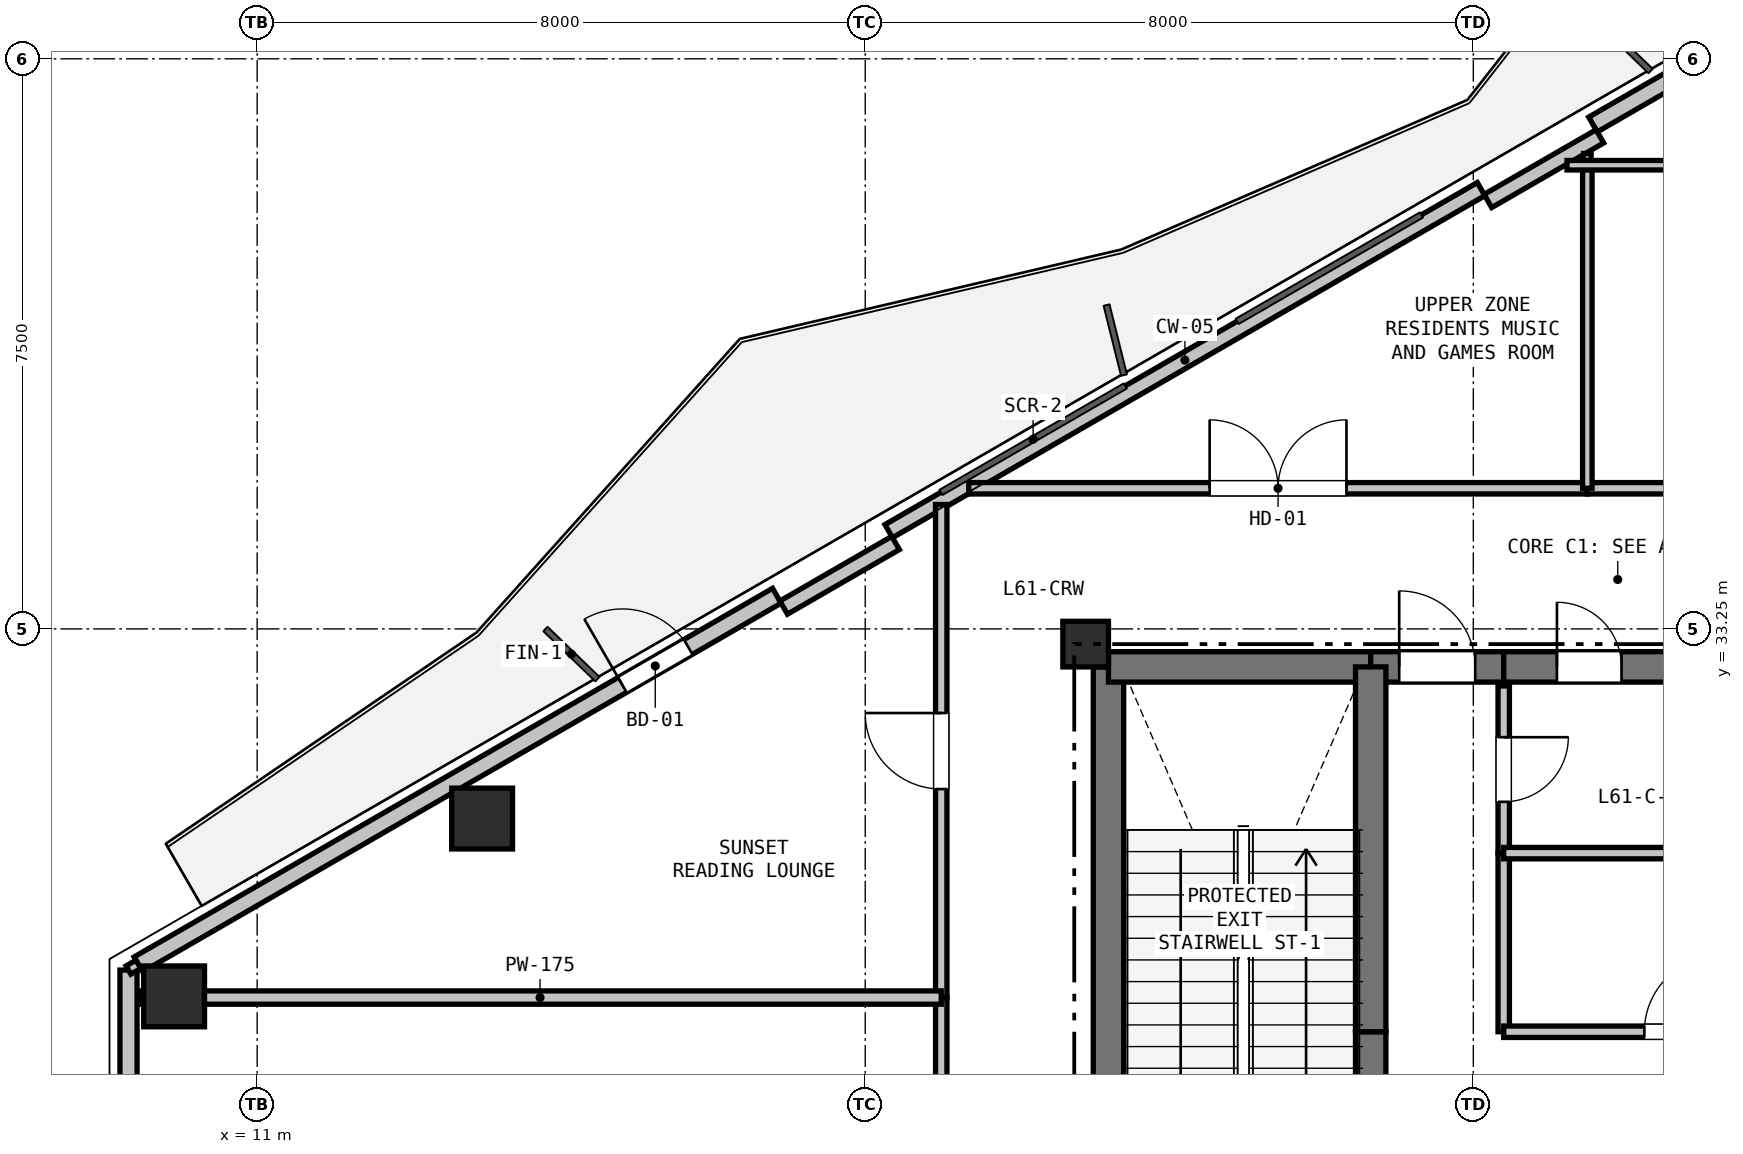
"""IFC4 building model, lengths in metres.
Left out: names, types, materials, properties, quantities, classifications, styles, units other than length and angle.
Written with IfcOpenShell. Run it as: python <this file> out.ifc"""

import sys

from ifc_helpers import new_model, si_unit, direction, frame, frame_2d, origin, origin_2d, place, context, subcontext, project, spatial, rectangle, hollow_rectangle, extrude, element, fill, save


model = new_model("IFC4")
c1 = context("Model", 3, precision=1e-05, world=origin(), true_north=direction((0.0, 1.0)))
c2 = subcontext(c1, "Body", "Model", "MODEL_VIEW")
j1 = project(units=[si_unit("LENGTHUNIT", "METRE"), si_unit("PLANEANGLEUNIT", "RADIAN")], contexts=[c1])
p1 = place(None, origin())
s1 = spatial("IfcSite", under=j1, at=p1, CompositionType="ELEMENT")
p2 = place(p1, origin())
s2 = spatial("IfcBuilding", under=s1, at=p2, CompositionType="ELEMENT")
p3 = place(p2, frame((0.0, 0.0, 218.4)))
s3 = spatial("IfcBuildingStorey", under=s2, at=p3, CompositionType="ELEMENT", Elevation=218.4)
p4 = place(p3, frame((21.9, 33.05, 0.0), z_axis=(0.0, 0.0, 1.0), x_axis=(1.0, 0.0, 0.0)))
e1 = element("IfcColumn", 1, at=p4, inside=s3, PredefinedType="COLUMN", context=c2, shape_type="SweptSolid", body=[
    extrude(rectangle(XDim=0.6, YDim=0.6, at=origin_2d()), origin(), (0.0, 0.0, 1.0), 4.8),
])
for number, where, z_axis, x_axis in (
    (2, (9.907, 28.415, 0.0), (0.0, 0.0, 1.0), (1.0, 0.0, 0.0)),
    (3, (13.96, 30.755, 0.0), (0.0, 0.0, 1.0), (1.0, 0.0, 0.0)),
):
    element("IfcColumn", number, at=place(p3, frame(where, z_axis=z_axis, x_axis=x_axis)), inside=s3, PredefinedType="COLUMN", context=c2, shape_type="SweptSolid", body=[
        extrude(hollow_rectangle(XDim=0.8, YDim=0.8, WallThickness=0.025, at=origin_2d()), origin(), (0.0, 0.0, 1.0), 3.23),
    ])
p5 = place(p3, frame((9.308, 24.738, 0.0), z_axis=(0.0, 0.0, 1.0), x_axis=(0.0, 1.0, 0.0)))
e4 = element("IfcWall", 4, at=p5, inside=s3, PredefinedType="SOLIDWALL", context=c2, shape_type="SweptSolid", body=[
    extrude(rectangle(XDim=4.023, YDim=0.225, at=frame_2d((2.012, 0.0))), origin(), (0.0, 0.0, 1.0), 4.2),
])
p6 = place(p3, frame((9.438, 28.837, 0.0), z_axis=(0.0, 0.0, 1.0), x_axis=(0.866027133173, 0.499997004599, 0.0)))
e5 = element("IfcWall", 5, at=p6, inside=s3, PredefinedType="SOLIDWALL", context=c2, shape_type="SweptSolid", body=[
    extrude(rectangle(XDim=9.699, YDim=0.225, at=frame_2d((4.849, 0.0))), origin(), (0.0, 0.0, 1.0), 4.2),
])
p7 = place(p6, frame((7.352, 0.0, 0.0)))
e6 = element("IfcOpeningElement", 6, at=p7, cuts=e5, PredefinedType="OPENING", context=c2, shape_type="SweptSolid", body=[
    extrude(rectangle(XDim=1.0, YDim=2.1, at=frame_2d((0.5, 1.05))), frame((0.0, 0.123, 0.0), z_axis=(0.0, -1.0, 0.0), x_axis=(1.0, 0.0, 0.0)), (0.0, 0.0, 1.0), 0.245),
])
p8 = place(p3, frame((19.309, 34.536, 0.0), z_axis=(0.0, 0.0, 1.0), x_axis=(0.866020680503, 0.500008180874, 0.0)))
e7 = element("IfcWall", 7, at=p8, inside=s3, PredefinedType="PARAPET", context=c2, shape_type="SweptSolid", body=[
    extrude(rectangle(XDim=8.999, YDim=0.2, at=frame_2d((4.5, 0.0))), origin(), (0.0, 0.0, 1.0), 0.2),
])
p9 = place(p3, frame((28.575, 39.885, 0.0), z_axis=(0.0, 0.0, 1.0), x_axis=(0.866016233231, 0.500015883528, 0.0)))
e8 = element("IfcWall", 8, at=p9, inside=s3, PredefinedType="SOLIDWALL", context=c2, shape_type="SweptSolid", body=[
    extrude(rectangle(XDim=9.699, YDim=0.225, at=frame_2d((4.85, 0.0))), origin(), (0.0, 0.0, 1.0), 3.215),
])
p10 = place(p9, frame((1.606, 0.0, 0.9)))
e9 = element("IfcOpeningElement", 9, at=p10, cuts=e8, PredefinedType="OPENING", context=c2, shape_type="SweptSolid", body=[
    extrude(rectangle(XDim=2.4, YDim=2.2, at=frame_2d((1.2, 1.1))), frame((0.0, 0.123, 0.0), z_axis=(0.0, -1.0, 0.0), x_axis=(1.0, 0.0, 0.0)), (0.0, 0.0, 1.0), 0.245),
])
p11 = place(p3, frame((17.927, 33.53, 0.0), z_axis=(0.0, 0.0, 1.0), x_axis=(0.86605165483, 0.499954529098, 0.0)))
e10 = element("IfcWall", 10, at=p11, inside=s3, PredefinedType="PARAPET", context=c2, shape_type="SweptSolid", body=[
    extrude(rectangle(XDim=1.7, YDim=0.2, at=frame_2d((0.85, 0.0))), origin(), (0.0, 0.0, 1.0), 4.2),
])
p12 = place(p3, frame((27.192, 38.88, 0.0), z_axis=(0.0, 0.0, 1.0), x_axis=(0.866025371046, 0.500000056704, 0.0)))
e11 = element("IfcWall", 11, at=p12, inside=s3, PredefinedType="PARAPET", context=c2, shape_type="SweptSolid", body=[
    extrude(rectangle(XDim=1.7, YDim=0.2, at=frame_2d((0.85, 0.0))), origin(), (0.0, 0.0, 1.0), 4.2),
])
p13 = place(p3, frame((22.2, 25.4, 0.0), z_axis=(0.0, 0.0, 1.0), x_axis=(0.0, 1.0, 0.0)))
e12 = element("IfcWall", 12, at=p13, inside=s3, PredefinedType="SHEAR", context=c2, shape_type="SweptSolid", body=[
    extrude(rectangle(XDim=7.35, YDim=0.4, at=frame_2d((3.675, 0.0))), origin(), (0.0, 0.0, 1.0), 4.58),
])
p14 = place(p3, frame((22.2, 32.75, 0.0), z_axis=(0.0, 0.0, 1.0), x_axis=(1.0, 0.0, 0.0)))
e13 = element("IfcWall", 13, at=p14, inside=s3, PredefinedType="SHEAR", context=c2, shape_type="SweptSolid", body=[
    extrude(rectangle(XDim=3.45, YDim=0.4, at=frame_2d((1.725, 0.0))), origin(), (0.0, 0.0, 1.0), 4.58),
])
p15 = place(p3, frame((25.65, 32.75, 0.0), z_axis=(0.0, 0.0, 1.0), x_axis=(1.0, 0.0, 0.0)))
e14 = element("IfcWall", 14, at=p15, inside=s3, PredefinedType="SHEAR", context=c2, shape_type="SweptSolid", body=[
    extrude(rectangle(XDim=1.75, YDim=0.4, at=frame_2d((0.875, 0.0))), origin(), (0.0, 0.0, 1.0), 4.58),
])
p16 = place(p15, frame((0.375, 0.0, 0.0)))
e15 = element("IfcOpeningElement", 15, at=p16, cuts=e14, PredefinedType="OPENING", context=c2, shape_type="SweptSolid", body=[
    extrude(rectangle(XDim=1.0, YDim=2.15, at=frame_2d((0.5, 1.075))), frame((0.0, 0.21, 0.0), z_axis=(0.0, -1.0, 0.0), x_axis=(1.0, 0.0, 0.0)), (0.0, 0.0, 1.0), 0.42),
])
p17 = place(p3, frame((27.4, 32.75, 0.0), z_axis=(0.0, 0.0, 1.0), x_axis=(1.0, 0.0, 0.0)))
e16 = element("IfcWall", 16, at=p17, inside=s3, PredefinedType="SHEAR", context=c2, shape_type="SweptSolid", body=[
    extrude(rectangle(XDim=2.25, YDim=0.4, at=frame_2d((1.125, 0.0))), origin(), (0.0, 0.0, 1.0), 4.58),
])
p18 = place(p17, frame((0.7, 0.0, 0.0)))
e17 = element("IfcOpeningElement", 17, at=p18, cuts=e16, PredefinedType="OPENING", context=c2, shape_type="SweptSolid", body=[
    extrude(rectangle(XDim=0.85, YDim=2.1, at=frame_2d((0.425, 1.05))), frame((0.0, 0.21, 0.0), z_axis=(0.0, -1.0, 0.0), x_axis=(1.0, 0.0, 0.0)), (0.0, 0.0, 1.0), 0.42),
])
p19 = place(p3, frame((25.65, 25.55, 0.0), z_axis=(0.0, 0.0, 1.0), x_axis=(0.0, 1.0, 0.0)))
e18 = element("IfcWall", 18, at=p19, inside=s3, PredefinedType="SHEAR", context=c2, shape_type="SweptSolid", body=[
    extrude(rectangle(XDim=2.4, YDim=0.4, at=frame_2d((1.2, 0.0))), origin(), (0.0, 0.0, 1.0), 4.58),
])
p20 = place(p3, frame((25.65, 27.95, 0.0), z_axis=(0.0, 0.0, 1.0), x_axis=(0.0, 1.0, 0.0)))
e19 = element("IfcWall", 19, at=p20, inside=s3, PredefinedType="SHEAR", context=c2, shape_type="SweptSolid", body=[
    extrude(rectangle(XDim=4.8, YDim=0.4, at=frame_2d((2.4, 0.0))), origin(), (0.0, 0.0, 1.0), 4.58),
])
p21 = place(p3, frame((27.4, 32.5, 0.0), z_axis=(0.0, 0.0, 1.0), x_axis=(0.0, -1.0, 0.0)))
e20 = element("IfcWall", 20, at=p21, inside=s3, PredefinedType="PARTITIONING", context=c2, shape_type="SweptSolid", body=[
    extrude(rectangle(XDim=2.2, YDim=0.15, at=frame_2d((1.1, 0.0))), origin(), (0.0, 0.0, 1.0), 4.58),
])
p22 = place(p21, frame((0.675, 0.0, 0.0)))
e21 = element("IfcOpeningElement", 21, at=p22, cuts=e20, PredefinedType="OPENING", context=c2, shape_type="SweptSolid", body=[
    extrude(rectangle(XDim=0.85, YDim=2.1, at=frame_2d((0.425, 1.05))), frame((0.0, 0.085, 0.0), z_axis=(0.0, -1.0, 0.0), x_axis=(1.0, 0.0, 0.0)), (0.0, 0.0, 1.0), 0.17),
])
p23 = place(p3, frame((27.4, 30.3, 0.0), z_axis=(0.0, 0.0, 1.0), x_axis=(0.0, -1.0, 0.0)))
e22 = element("IfcWall", 22, at=p23, inside=s3, PredefinedType="PARTITIONING", context=c2, shape_type="SweptSolid", body=[
    extrude(rectangle(XDim=2.35, YDim=0.15, at=frame_2d((1.175, 0.0))), origin(), (0.0, 0.0, 1.0), 4.58),
])
p24 = place(p3, frame((27.4, 27.95, 0.0), z_axis=(0.0, 0.0, 1.0), x_axis=(1.0, 0.0, 0.0)))
e23 = element("IfcWall", 23, at=p24, inside=s3, PredefinedType="PARTITIONING", context=c2, shape_type="SweptSolid", body=[
    extrude(rectangle(XDim=4.7, YDim=0.15, at=frame_2d((2.35, 0.0))), origin(), (0.0, 0.0, 1.0), 4.58),
])
p25 = place(p24, frame((1.85, 0.0, 0.0)))
e24 = element("IfcOpeningElement", 24, at=p25, cuts=e23, PredefinedType="OPENING", context=c2, shape_type="SweptSolid", body=[
    extrude(rectangle(XDim=1.0, YDim=2.15, at=frame_2d((0.5, 1.075))), frame((0.0, 0.085, 0.0), z_axis=(0.0, -1.0, 0.0), x_axis=(1.0, 0.0, 0.0)), (0.0, 0.0, 1.0), 0.17),
])
p26 = place(p3, frame((20.362, 35.1, 0.0), z_axis=(0.0, 0.0, 1.0), x_axis=(1.0, 0.0, 0.0)))
e25 = element("IfcWall", 25, at=p26, inside=s3, PredefinedType="PARTITIONING", context=c2, shape_type="SweptSolid", body=[
    extrude(rectangle(XDim=8.138, YDim=0.15, at=frame_2d((4.069, 0.0))), origin(), (0.0, 0.0, 1.0), 2.365),
])
p27 = place(p26, frame((3.169, 0.0, 0.0)))
e26 = element("IfcOpeningElement", 26, at=p27, cuts=e25, PredefinedType="OPENING", context=c2, shape_type="SweptSolid", body=[
    extrude(rectangle(XDim=1.8, YDim=2.2, at=frame_2d((0.9, 1.1))), frame((0.0, 0.085, 0.0), z_axis=(0.0, -1.0, 0.0), x_axis=(1.0, 0.0, 0.0)), (0.0, 0.0, 1.0), 0.17),
])
p28 = place(p3, frame((28.5, 35.1, 0.0), z_axis=(0.0, 0.0, 1.0), x_axis=(1.0, 0.0, 0.0)))
e27 = element("IfcWall", 27, at=p28, inside=s3, PredefinedType="PARTITIONING", context=c2, shape_type="SweptSolid", body=[
    extrude(rectangle(XDim=6.5, YDim=0.15, at=frame_2d((3.25, 0.0))), origin(), (0.0, 0.0, 1.0), 3.215),
])
p29 = place(p28, frame((2.75, 0.0, 0.0)))
e28 = element("IfcOpeningElement", 28, at=p29, cuts=e27, PredefinedType="OPENING", context=c2, shape_type="SweptSolid", body=[
    extrude(rectangle(XDim=1.0, YDim=2.15, at=frame_2d((0.5, 1.075))), frame((0.0, 0.085, 0.0), z_axis=(0.0, -1.0, 0.0), x_axis=(1.0, 0.0, 0.0)), (0.0, 0.0, 1.0), 0.17),
])
p30 = place(p3, frame((20.0, 24.4, 0.0), z_axis=(0.0, 0.0, 1.0), x_axis=(0.0, 1.0, 0.0)))
e29 = element("IfcWall", 29, at=p30, inside=s3, PredefinedType="PARTITIONING", context=c2, shape_type="SweptSolid", body=[
    extrude(rectangle(XDim=4.0, YDim=0.15, at=frame_2d((2.0, 0.0))), origin(), (0.0, 0.0, 1.0), 3.215),
])
p31 = place(p30, frame((1.575, 0.0, 0.0)))
e30 = element("IfcOpeningElement", 30, at=p31, cuts=e29, PredefinedType="OPENING", context=c2, shape_type="SweptSolid", body=[
    extrude(rectangle(XDim=0.85, YDim=2.1, at=frame_2d((0.425, 1.05))), frame((0.0, 0.085, 0.0), z_axis=(0.0, -1.0, 0.0), x_axis=(1.0, 0.0, 0.0)), (0.0, 0.0, 1.0), 0.17),
])
p32 = place(p3, frame((20.0, 28.4, 0.0), z_axis=(0.0, 0.0, 1.0), x_axis=(0.0, 1.0, 0.0)))
e31 = element("IfcWall", 31, at=p32, inside=s3, PredefinedType="PARTITIONING", context=c2, shape_type="SweptSolid", body=[
    extrude(rectangle(XDim=6.487, YDim=0.15, at=frame_2d((3.243, 0.0))), origin(), (0.0, 0.0, 1.0), 2.365),
])
p33 = place(p32, frame((2.743, 0.0, 0.0)))
e32 = element("IfcOpeningElement", 32, at=p33, cuts=e31, PredefinedType="OPENING", context=c2, shape_type="SweptSolid", body=[
    extrude(rectangle(XDim=1.0, YDim=2.15, at=frame_2d((0.5, 1.075))), frame((0.0, 0.085, 0.0), z_axis=(0.0, -1.0, 0.0), x_axis=(1.0, 0.0, 0.0)), (0.0, 0.0, 1.0), 0.17),
])
p34 = place(p3, frame((9.444, 28.4, 0.0), z_axis=(0.0, 0.0, 1.0), x_axis=(1.0, 0.0, 0.0)))
e33 = element("IfcWall", 33, at=p34, inside=s3, PredefinedType="PLUMBINGWALL", context=c2, shape_type="SweptSolid", body=[
    extrude(rectangle(XDim=10.556, YDim=0.175, at=frame_2d((5.278, 0.0))), origin(), (0.0, 0.0, 1.0), 3.215),
])
p35 = place(p3, frame((27.4, 30.3, 0.0), z_axis=(0.0, 0.0, 1.0), x_axis=(1.0, 0.0, 0.0)))
e34 = element("IfcWall", 34, at=p35, inside=s3, PredefinedType="PARTITIONING", context=c2, shape_type="SweptSolid", body=[
    extrude(rectangle(XDim=2.25, YDim=0.15, at=frame_2d((1.125, 0.0))), origin(), (0.0, 0.0, 1.0), 4.58),
])
p36 = place(p3, frame((28.5, 39.504, 0.0), z_axis=(0.0, 0.0, 1.0), x_axis=(0.0, -1.0, 0.0)))
e35 = element("IfcWall", 35, at=p36, inside=s3, PredefinedType="PARTITIONING", context=c2, shape_type="SweptSolid", body=[
    extrude(rectangle(XDim=0.154, YDim=0.1, at=frame_2d((0.077, 0.0))), origin(), (0.0, 0.0, 1.0), 4.58),
])
p37 = place(p3, frame((28.5, 39.35, 0.0), z_axis=(0.0, 0.0, 1.0), x_axis=(0.0, -1.0, 0.0)))
e36 = element("IfcWall", 36, at=p37, inside=s3, PredefinedType="PARTITIONING", context=c2, shape_type="SweptSolid", body=[
    extrude(rectangle(XDim=4.25, YDim=0.125, at=frame_2d((2.125, 0.0))), origin(), (0.0, 0.0, 1.0), 2.365),
])
p38 = place(p3, frame((28.232, 39.35, 0.0), z_axis=(0.0, 0.0, 1.0), x_axis=(1.0, 0.0, 0.0)))
e37 = element("IfcWall", 37, at=p38, inside=s3, PredefinedType="PARTITIONING", context=c2, shape_type="SweptSolid", body=[
    extrude(rectangle(XDim=6.768, YDim=0.125, at=frame_2d((3.384, 0.0))), origin(), (0.0, 0.0, 1.0), 2.365),
])
p39 = place(p38, frame((3.048, 0.0, 0.0)))
e38 = element("IfcOpeningElement", 38, at=p39, cuts=e37, PredefinedType="OPENING", context=c2, shape_type="SweptSolid", body=[
    extrude(rectangle(XDim=0.9, YDim=2.1, at=frame_2d((0.45, 1.05))), frame((0.0, 0.073, 0.0), z_axis=(0.0, -1.0, 0.0), x_axis=(1.0, 0.0, 0.0)), (0.0, 0.0, 1.0), 0.145),
])
p40 = place(p3, frame((9.307, 28.762, 0.0), z_axis=(0.0, 0.0, 1.0), x_axis=(0.865833797362, 0.500331725305, 0.0)))
e39 = element("IfcWall", 39, at=p40, inside=s3, PredefinedType="PARTITIONING", context=c2, shape_type="SweptSolid", body=[
    extrude(rectangle(XDim=0.15, YDim=0.125, at=frame_2d((0.075, 0.0))), origin(), (0.0, 0.0, 1.0), 4.58),
])
p41 = place(p7, origin())
e40 = element("IfcDoor", 40, at=p41, inside=s3, OperationType="SINGLE_SWING_LEFT", PredefinedType="DOOR", context=c2, shape_type="SweptSolid", body=[
    extrude(rectangle(XDim=1.0, YDim=2.1, at=frame_2d((0.5, 1.05))), frame((0.0, 0.025, 0.0), z_axis=(0.0, -1.0, 0.0), x_axis=(1.0, 0.0, 0.0)), (0.0, 0.0, 1.0), 0.05),
])
fill(e6, e40)
p42 = place(p16, origin())
e41 = element("IfcDoor", 41, at=p42, inside=s3, OperationType="SINGLE_SWING_LEFT", PredefinedType="DOOR", context=c2, shape_type="SweptSolid", body=[
    extrude(rectangle(XDim=1.0, YDim=2.15, at=frame_2d((0.5, 1.075))), frame((0.0, 0.025, 0.0), z_axis=(0.0, -1.0, 0.0), x_axis=(1.0, 0.0, 0.0)), (0.0, 0.0, 1.0), 0.05),
])
fill(e15, e41)
p43 = place(p25, origin())
e42 = element("IfcDoor", 42, at=p43, inside=s3, OperationType="SINGLE_SWING_RIGHT", PredefinedType="DOOR", context=c2, shape_type="SweptSolid", body=[
    extrude(rectangle(XDim=1.0, YDim=2.15, at=frame_2d((0.5, 1.075))), frame((0.0, 0.025, 0.0), z_axis=(0.0, -1.0, 0.0), x_axis=(1.0, 0.0, 0.0)), (0.0, 0.0, 1.0), 0.05),
])
fill(e24, e42)
p44 = place(p22, origin())
e43 = element("IfcDoor", 43, at=p44, inside=s3, OperationType="SINGLE_SWING_LEFT", PredefinedType="DOOR", context=c2, shape_type="SweptSolid", body=[
    extrude(rectangle(XDim=0.85, YDim=2.1, at=frame_2d((0.425, 1.05))), frame((0.0, 0.025, 0.0), z_axis=(0.0, -1.0, 0.0), x_axis=(1.0, 0.0, 0.0)), (0.0, 0.0, 1.0), 0.05),
])
fill(e21, e43)
p45 = place(p18, origin())
e44 = element("IfcDoor", 44, at=p45, inside=s3, OperationType="SINGLE_SWING_LEFT", PredefinedType="DOOR", context=c2, shape_type="SweptSolid", body=[
    extrude(rectangle(XDim=0.85, YDim=2.1, at=frame_2d((0.425, 1.05))), frame((0.0, 0.025, 0.0), z_axis=(0.0, -1.0, 0.0), x_axis=(1.0, 0.0, 0.0)), (0.0, 0.0, 1.0), 0.05),
])
fill(e17, e44)
p46 = place(p27, origin())
e45 = element("IfcDoor", 45, at=p46, inside=s3, OperationType="DOUBLE_DOOR_SINGLE_SWING", PredefinedType="DOOR", context=c2, shape_type="SweptSolid", body=[
    extrude(rectangle(XDim=1.8, YDim=2.2, at=frame_2d((0.9, 1.1))), frame((0.0, 0.025, 0.0), z_axis=(0.0, -1.0, 0.0), x_axis=(1.0, 0.0, 0.0)), (0.0, 0.0, 1.0), 0.05),
])
fill(e26, e45)
p47 = place(p33, origin())
e46 = element("IfcDoor", 46, at=p47, inside=s3, OperationType="SINGLE_SWING_RIGHT", PredefinedType="DOOR", context=c2, shape_type="SweptSolid", body=[
    extrude(rectangle(XDim=1.0, YDim=2.15, at=frame_2d((0.5, 1.075))), frame((0.0, 0.025, 0.0), z_axis=(0.0, -1.0, 0.0), x_axis=(1.0, 0.0, 0.0)), (0.0, 0.0, 1.0), 0.05),
])
fill(e32, e46)
save(model, sys.argv[1])
